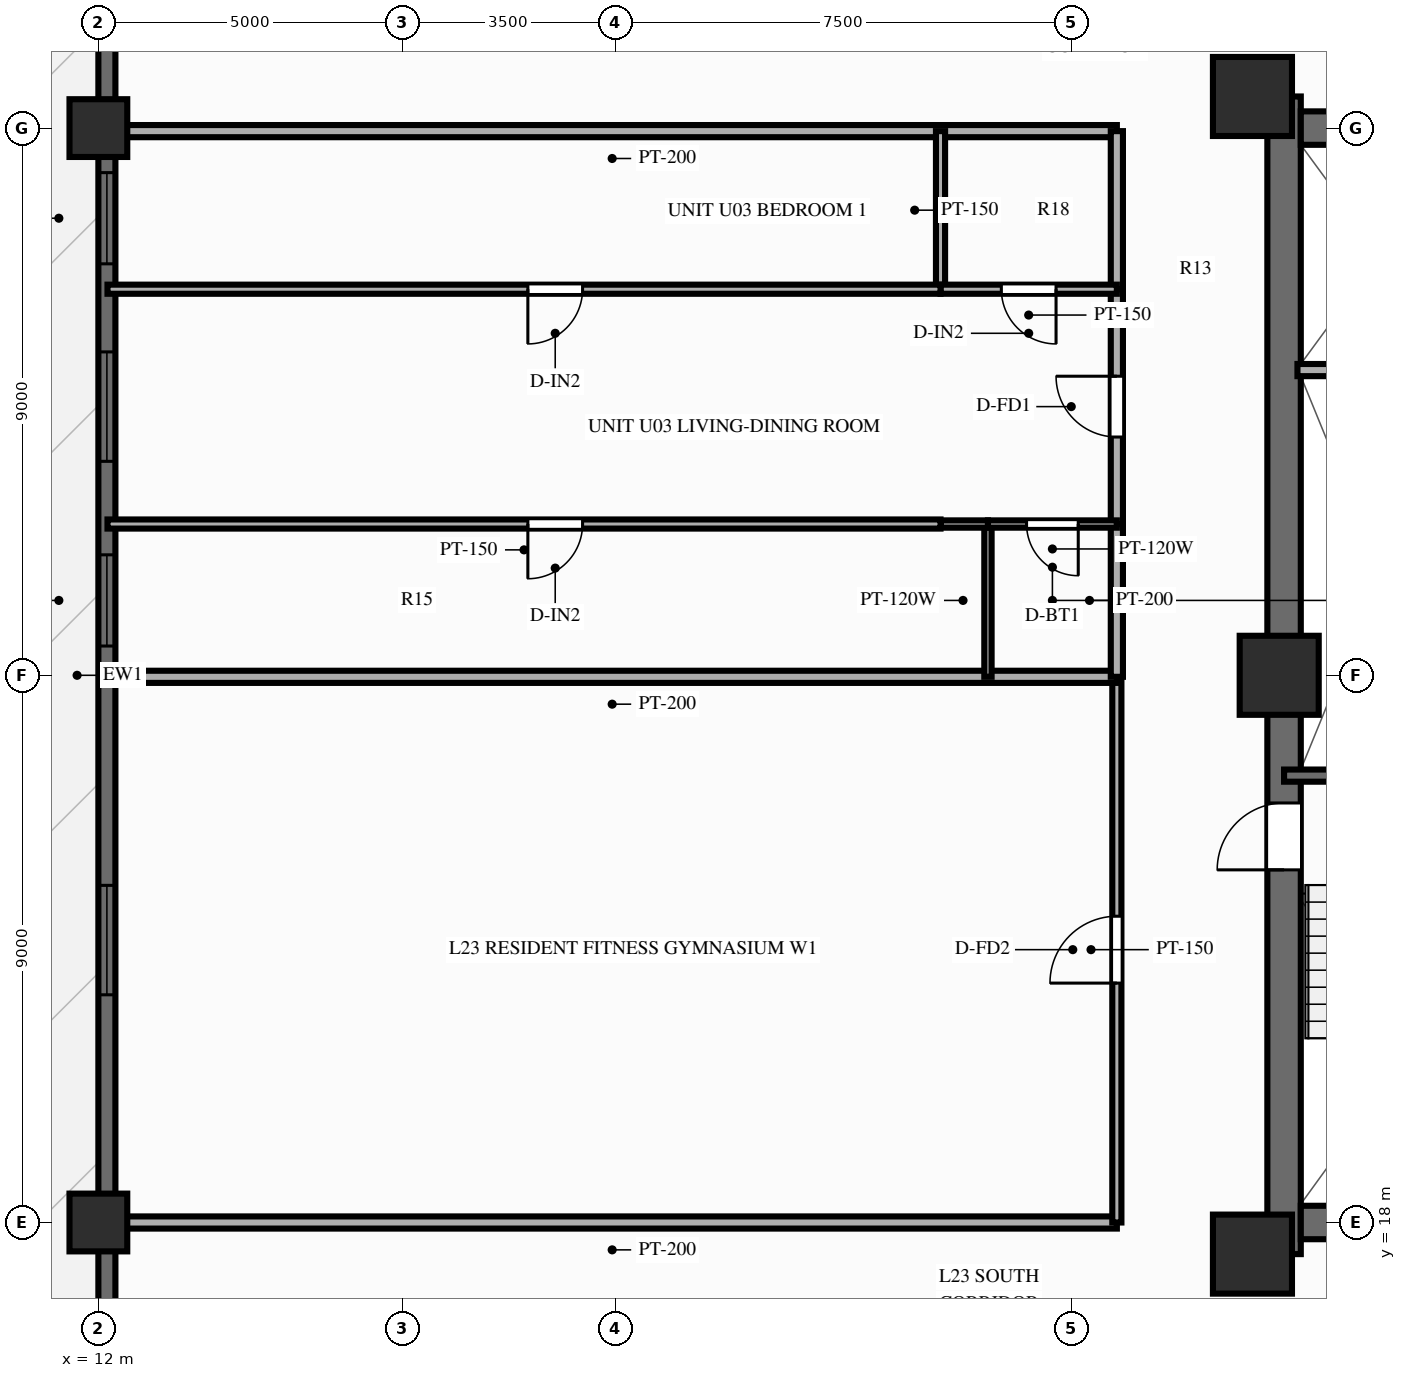
"""IFC4 building model, lengths in metres.
Left out: names, types, materials, properties, quantities, classifications, styles, units other than length and angle.
Written with IfcOpenShell. Run it as: python <this file> out.ifc"""

import sys

from ifc_helpers import new_model, si_unit, direction, frame, frame_2d, origin, origin_2d, place, context, subcontext, project, spatial, rectangle, extrude, source, transform, mapped, element, fill, save


model = new_model("IFC4")
c1 = context("Model", 3, precision=1e-05, world=origin(), true_north=direction((0.0, 1.0)))
c2 = subcontext(c1, "Body", "Model", "MODEL_VIEW")
j1 = project(units=[si_unit("LENGTHUNIT", "METRE"), si_unit("PLANEANGLEUNIT", "RADIAN")], contexts=[c1])
p1 = place(None, origin())
s1 = spatial("IfcSite", under=j1, at=p1, CompositionType="ELEMENT")
p2 = place(p1, origin())
s2 = spatial("IfcBuilding", under=s1, at=p2, CompositionType="ELEMENT")
p3 = place(p2, frame((0.0, 0.0, 74.35)))
s3 = spatial("IfcBuildingStorey", under=s2, at=p3, CompositionType="ELEMENT", Elevation=74.35)
p4 = place(p3, frame((31.5, 17.48, 0.0), z_axis=(0.0, 0.0, 1.0), x_axis=(0.0, 1.0, 0.0)))
e1 = element("IfcWall", 1, at=p4, inside=s3, PredefinedType="SHEAR", context=c2, shape_type="SweptSolid", body=[
    extrude(rectangle(XDim=19.04, YDim=0.55, at=frame_2d((9.52, 0.0))), origin(), (0.0, 0.0, 1.0), 3.5),
])
p5 = place(p4, frame((6.32, 0.0, 0.0)))
e2 = element("IfcOpeningElement", 2, at=p5, cuts=e1, PredefinedType="OPENING", context=c2, shape_type="SweptSolid", body=[
    extrude(rectangle(XDim=1.1, YDim=2.15, at=frame_2d((0.55, 1.075))), frame((0.0, 0.287, 0.0), z_axis=(0.0, -1.0, 0.0), x_axis=(1.0, 0.0, 0.0)), (0.0, 0.0, 1.0), 0.574),
])
p6 = place(p3, frame((31.775, 18.0, 0.0), z_axis=(0.0, 0.0, 1.0), x_axis=(1.0, 0.0, 0.0)))
e3 = element("IfcWall", 3, at=p6, inside=s3, PredefinedType="SHEAR", context=c2, shape_type="SweptSolid", body=[
    extrude(rectangle(XDim=12.45, YDim=0.55, at=frame_2d((6.225, 0.0))), origin(), (0.0, 0.0, 1.0), 3.5),
])
p7 = place(p3, frame((31.775, 36.0, 0.0), z_axis=(0.0, 0.0, 1.0), x_axis=(1.0, 0.0, 0.0)))
e4 = element("IfcWall", 4, at=p7, inside=s3, PredefinedType="SHEAR", context=c2, shape_type="SweptSolid", body=[
    extrude(rectangle(XDim=12.45, YDim=0.55, at=frame_2d((6.225, 0.0))), origin(), (0.0, 0.0, 1.0), 3.5),
])
p8 = place(p7, frame((5.175, 0.0, 0.0), z_axis=(0.0, 0.0, 1.0), x_axis=(-1.0, 0.0, 0.0)))
e5 = element("IfcOpeningElement", 5, at=p8, cuts=e4, PredefinedType="OPENING", context=c2, shape_type="SweptSolid", body=[
    extrude(rectangle(XDim=1.4, YDim=2.15, at=frame_2d((0.7, 1.075))), frame((0.0, 0.287, 0.0), z_axis=(0.0, -1.0, 0.0), x_axis=(1.0, 0.0, 0.0)), (0.0, 0.0, 1.0), 0.574),
])
m1 = source(origin(), c2, "Body", "SweptSolid", [
    extrude(rectangle(XDim=1.3, YDim=1.3, at=origin_2d()), origin(), (0.0, 0.0, 1.0), 3.5),
])
for number, where, z_axis, x_axis in (
    (6, (30.98, 17.48, 0.0), (0.0, 0.0, 1.0), (1.0, 0.0, 0.0)),
    (7, (30.98, 36.52, 0.0), (0.0, 0.0, 1.0), (1.0, 0.0, 0.0)),
    (8, (31.42, 27.0, 0.0), (0.0, 0.0, 1.0), (1.0, 0.0, 0.0)),
):
    element("IfcColumn", number, at=place(p3, frame(where, z_axis=z_axis, x_axis=x_axis)), inside=s3, PredefinedType="COLUMN", context=c2, shape_type="MappedRepresentation", body=[
        mapped(m1, transform((0.0, 0.0, 0.0), scale=1.0)),
    ])
m2 = source(origin(), c2, "Body", "SweptSolid", [
    extrude(rectangle(XDim=0.95, YDim=0.95, at=origin_2d()), origin(), (0.0, 0.0, 1.0), 3.5),
])
for number, where, z_axis, x_axis in (
    (9, (12.0, 36.0, 0.0), (0.0, 0.0, 1.0), (1.0, 0.0, 0.0)),
    (10, (12.0, 18.0, 0.0), (0.0, 0.0, 1.0), (1.0, 0.0, 0.0)),
):
    element("IfcColumn", number, at=place(p3, frame(where, z_axis=z_axis, x_axis=x_axis)), inside=s3, PredefinedType="COLUMN", context=c2, shape_type="MappedRepresentation", body=[
        mapped(m2, transform((0.0, 0.0, 0.0), scale=1.0)),
    ])
p9 = place(p3, frame((12.14, 7.2, 0.0), z_axis=(0.0, 0.0, 1.0), x_axis=(0.0, 1.0, 0.0)))
e11 = element("IfcWall", 11, at=p9, inside=s3, PredefinedType="SOLIDWALL", context=c2, shape_type="SweptSolid", body=[
    extrude(rectangle(XDim=39.6, YDim=0.28, at=frame_2d((19.8, 0.0))), origin(), (0.0, 0.0, 1.0), 2.78),
])
p10 = place(p9, frame((4.6, 0.0, 0.0)))
e12 = element("IfcOpeningElement", 12, at=p10, cuts=e11, PredefinedType="OPENING", context=c2, shape_type="SweptSolid", body=[
    extrude(rectangle(XDim=1.6, YDim=2.15, at=frame_2d((0.8, 1.075))), frame((0.0, 0.152, 0.0), z_axis=(0.0, -1.0, 0.0), x_axis=(1.0, 0.0, 0.0)), (0.0, 0.0, 1.0), 0.304),
])
p11 = place(p9, frame((14.545, 0.0, 0.85)))
e13 = element("IfcOpeningElement", 13, at=p11, cuts=e11, PredefinedType="OPENING", context=c2, shape_type="SweptSolid", body=[
    extrude(rectangle(XDim=1.8, YDim=1.65, at=frame_2d((0.9, 0.825))), frame((0.0, 0.152, 0.0), z_axis=(0.0, -1.0, 0.0), x_axis=(1.0, 0.0, 0.0)), (0.0, 0.0, 1.0), 0.304),
])
p12 = place(p9, frame((20.281, 0.0, 0.85)))
e14 = element("IfcOpeningElement", 14, at=p12, cuts=e11, PredefinedType="OPENING", context=c2, shape_type="SweptSolid", body=[
    extrude(rectangle(XDim=1.5, YDim=1.65, at=frame_2d((0.75, 0.825))), frame((0.0, 0.152, 0.0), z_axis=(0.0, -1.0, 0.0), x_axis=(1.0, 0.0, 0.0)), (0.0, 0.0, 1.0), 0.304),
])
p13 = place(p9, frame((23.319, 0.0, 0.85)))
e15 = element("IfcOpeningElement", 15, at=p13, cuts=e11, PredefinedType="OPENING", context=c2, shape_type="SweptSolid", body=[
    extrude(rectangle(XDim=1.8, YDim=1.65, at=frame_2d((0.9, 0.825))), frame((0.0, 0.152, 0.0), z_axis=(0.0, -1.0, 0.0), x_axis=(1.0, 0.0, 0.0)), (0.0, 0.0, 1.0), 0.304),
])
p14 = place(p9, frame((26.567, 0.0, 0.85)))
e16 = element("IfcOpeningElement", 16, at=p14, cuts=e11, PredefinedType="OPENING", context=c2, shape_type="SweptSolid", body=[
    extrude(rectangle(XDim=1.5, YDim=1.65, at=frame_2d((0.75, 0.825))), frame((0.0, 0.152, 0.0), z_axis=(0.0, -1.0, 0.0), x_axis=(1.0, 0.0, 0.0)), (0.0, 0.0, 1.0), 0.304),
])
p15 = place(p9, frame((33.3, 0.0, 0.85)))
e17 = element("IfcOpeningElement", 17, at=p15, cuts=e11, PredefinedType="OPENING", context=c2, shape_type="SweptSolid", body=[
    extrude(rectangle(XDim=1.8, YDim=1.65, at=frame_2d((0.9, 0.825))), frame((0.0, 0.152, 0.0), z_axis=(0.0, -1.0, 0.0), x_axis=(1.0, 0.0, 0.0)), (0.0, 0.0, 1.0), 0.304),
])
p16 = place(p3, frame((31.5, 25.35, 0.0), z_axis=(0.0, 0.0, 1.0), x_axis=(1.0, 0.0, 0.0)))
e18 = element("IfcWall", 18, at=p16, inside=s3, PredefinedType="SOLIDWALL", context=c2, shape_type="SweptSolid", body=[
    extrude(rectangle(XDim=3.93, YDim=0.2, at=frame_2d((1.965, 0.0))), origin(), (0.0, 0.0, 1.0), 3.29),
])
p17 = place(p3, frame((31.72, 32.02, 0.0), z_axis=(0.0, 0.0, 1.0), x_axis=(1.0, 0.0, 0.0)))
e19 = element("IfcWall", 19, at=p17, inside=s3, PredefinedType="PARTITIONING", context=c2, shape_type="SweptSolid", body=[
    extrude(rectangle(XDim=2.8, YDim=0.2, at=frame_2d((1.4, 0.0))), origin(), (0.0, 0.0, 1.0), 3.29),
])
for number, where, z_axis, x_axis in (
    (20, (28.75, 18.0, 0.0), (0.0, 0.0, 1.0), (-1.0, 0.0, 0.0)),
    (21, (28.75, 35.95, 0.0), (0.0, 0.0, 1.0), (-1.0, 0.0, 0.0)),
):
    element("IfcWall", number, at=place(p3, frame(where, z_axis=z_axis, x_axis=x_axis)), inside=s3, PredefinedType="PARTITIONING", context=c2, shape_type="SweptSolid", body=[
        extrude(rectangle(XDim=16.6, YDim=0.2, at=frame_2d((8.3, 0.0))), origin(), (0.0, 0.0, 1.0), 2.84),
    ])
p18 = place(p3, frame((28.75, 18.0, 0.0), z_axis=(0.0, 0.0, 1.0), x_axis=(0.0, 1.0, 0.0)))
e22 = element("IfcWall", 22, at=p18, inside=s3, PredefinedType="PARTITIONING", context=c2, shape_type="SweptSolid", body=[
    extrude(rectangle(XDim=8.975, YDim=0.15, at=frame_2d((4.488, 0.0))), origin(), (0.0, 0.0, 1.0), 3.29),
])
p19 = place(p18, frame((3.938, 0.0, 0.0)))
e23 = element("IfcOpeningElement", 23, at=p19, cuts=e22, PredefinedType="OPENING", context=c2, shape_type="SweptSolid", body=[
    extrude(rectangle(XDim=1.1, YDim=2.15, at=frame_2d((0.55, 1.075))), frame((0.0, 0.087, 0.0), z_axis=(0.0, -1.0, 0.0), x_axis=(1.0, 0.0, 0.0)), (0.0, 0.0, 1.0), 0.174),
])
p20 = place(p3, frame((28.75, 26.975, 0.0), z_axis=(0.0, 0.0, 1.0), x_axis=(-1.0, 0.0, 0.0)))
e24 = element("IfcWall", 24, at=p20, inside=s3, PredefinedType="PARTITIONING", context=c2, shape_type="SweptSolid", body=[
    extrude(rectangle(XDim=16.6, YDim=0.2, at=frame_2d((8.3, 0.0))), origin(), (0.0, 0.0, 1.0), 3.29),
])
p21 = place(p3, frame((28.75, 26.975, 0.0), z_axis=(0.0, 0.0, 1.0), x_axis=(0.0, 1.0, 0.0)))
e25 = element("IfcWall", 25, at=p21, inside=s3, PredefinedType="PARTITIONING", context=c2, shape_type="SweptSolid", body=[
    extrude(rectangle(XDim=2.513, YDim=0.2, at=frame_2d((1.256, 0.0))), origin(), (0.0, 0.0, 1.0), 3.29),
])
p22 = place(p3, frame((28.75, 29.488, 0.0), z_axis=(0.0, 0.0, 1.0), x_axis=(0.0, 1.0, 0.0)))
e26 = element("IfcWall", 26, at=p22, inside=s3, PredefinedType="PARTITIONING", context=c2, shape_type="SweptSolid", body=[
    extrude(rectangle(XDim=3.862, YDim=0.2, at=frame_2d((1.931, 0.0))), origin(), (0.0, 0.0, 1.0), 3.29),
])
p23 = place(p22, frame((1.431, 0.0, 0.0)))
e27 = element("IfcOpeningElement", 27, at=p23, cuts=e26, PredefinedType="OPENING", context=c2, shape_type="SweptSolid", body=[
    extrude(rectangle(XDim=1.0, YDim=2.15, at=frame_2d((0.5, 1.075))), frame((0.0, 0.112, 0.0), z_axis=(0.0, -1.0, 0.0), x_axis=(1.0, 0.0, 0.0)), (0.0, 0.0, 1.0), 0.224),
])
p24 = place(p3, frame((28.75, 33.35, 0.0), z_axis=(0.0, 0.0, 1.0), x_axis=(0.0, 1.0, 0.0)))
e28 = element("IfcWall", 28, at=p24, inside=s3, PredefinedType="PARTITIONING", context=c2, shape_type="SweptSolid", body=[
    extrude(rectangle(XDim=2.6, YDim=0.2, at=frame_2d((1.3, 0.0))), origin(), (0.0, 0.0, 1.0), 3.29),
])
p25 = place(p3, frame((26.63, 26.975, 0.0), z_axis=(0.0, 0.0, 1.0), x_axis=(0.0, 1.0, 0.0)))
e29 = element("IfcWall", 29, at=p25, inside=s3, PredefinedType="PARTITIONING", context=c2, shape_type="SweptSolid", body=[
    extrude(rectangle(XDim=2.513, YDim=0.12, at=frame_2d((1.256, 0.0))), origin(), (0.0, 0.0, 1.0), 3.29),
])
p26 = place(p3, frame((25.85, 33.35, 0.0), z_axis=(0.0, 0.0, 1.0), x_axis=(0.0, 1.0, 0.0)))
e30 = element("IfcWall", 30, at=p26, inside=s3, PredefinedType="PARTITIONING", context=c2, shape_type="SweptSolid", body=[
    extrude(rectangle(XDim=2.6, YDim=0.15, at=frame_2d((1.3, 0.0))), origin(), (0.0, 0.0, 1.0), 3.29),
])
p27 = place(p3, frame((28.75, 29.488, 0.0), z_axis=(0.0, 0.0, 1.0), x_axis=(-1.0, 0.0, 0.0)))
e31 = element("IfcWall", 31, at=p27, inside=s3, PredefinedType="PARTITIONING", context=c2, shape_type="SweptSolid", body=[
    extrude(rectangle(XDim=2.12, YDim=0.12, at=frame_2d((1.06, 0.0))), origin(), (0.0, 0.0, 1.0), 3.29),
])
p28 = place(p27, frame((0.635, 0.0, 0.0)))
e32 = element("IfcOpeningElement", 32, at=p28, cuts=e31, PredefinedType="OPENING", context=c2, shape_type="SweptSolid", body=[
    extrude(rectangle(XDim=0.85, YDim=2.05, at=frame_2d((0.425, 1.025))), frame((0.0, 0.072, 0.0), z_axis=(0.0, -1.0, 0.0), x_axis=(1.0, 0.0, 0.0)), (0.0, 0.0, 1.0), 0.144),
])
p29 = place(p3, frame((26.63, 29.488, 0.0), z_axis=(0.0, 0.0, 1.0), x_axis=(-1.0, 0.0, 0.0)))
e33 = element("IfcWall", 33, at=p29, inside=s3, PredefinedType="PARTITIONING", context=c2, shape_type="SweptSolid", body=[
    extrude(rectangle(XDim=0.78, YDim=0.12, at=frame_2d((0.39, 0.0))), origin(), (0.0, 0.0, 1.0), 3.29),
])
p30 = place(p3, frame((25.85, 29.488, 0.0), z_axis=(0.0, 0.0, 1.0), x_axis=(-1.0, 0.0, 0.0)))
e34 = element("IfcWall", 34, at=p30, inside=s3, PredefinedType="PARTITIONING", context=c2, shape_type="SweptSolid", body=[
    extrude(rectangle(XDim=13.7, YDim=0.15, at=frame_2d((6.85, 0.0))), origin(), (0.0, 0.0, 1.0), 3.29),
])
p31 = place(p30, frame((5.887, 0.0, 0.0)))
e35 = element("IfcOpeningElement", 35, at=p31, cuts=e34, PredefinedType="OPENING", context=c2, shape_type="SweptSolid", body=[
    extrude(rectangle(XDim=0.9, YDim=2.1, at=frame_2d((0.45, 1.05))), frame((0.0, 0.087, 0.0), z_axis=(0.0, -1.0, 0.0), x_axis=(1.0, 0.0, 0.0)), (0.0, 0.0, 1.0), 0.174),
])
p32 = place(p3, frame((28.75, 33.35, 0.0), z_axis=(0.0, 0.0, 1.0), x_axis=(-1.0, 0.0, 0.0)))
e36 = element("IfcWall", 36, at=p32, inside=s3, PredefinedType="PARTITIONING", context=c2, shape_type="SweptSolid", body=[
    extrude(rectangle(XDim=2.9, YDim=0.15, at=frame_2d((1.45, 0.0))), origin(), (0.0, 0.0, 1.0), 3.29),
])
p33 = place(p32, frame((1.0, 0.0, 0.0)))
e37 = element("IfcOpeningElement", 37, at=p33, cuts=e36, PredefinedType="OPENING", context=c2, shape_type="SweptSolid", body=[
    extrude(rectangle(XDim=0.9, YDim=2.1, at=frame_2d((0.45, 1.05))), frame((0.0, 0.087, 0.0), z_axis=(0.0, -1.0, 0.0), x_axis=(1.0, 0.0, 0.0)), (0.0, 0.0, 1.0), 0.174),
])
p34 = place(p3, frame((25.85, 33.35, 0.0), z_axis=(0.0, 0.0, 1.0), x_axis=(-1.0, 0.0, 0.0)))
e38 = element("IfcWall", 38, at=p34, inside=s3, PredefinedType="PARTITIONING", context=c2, shape_type="SweptSolid", body=[
    extrude(rectangle(XDim=13.7, YDim=0.15, at=frame_2d((6.85, 0.0))), origin(), (0.0, 0.0, 1.0), 3.29),
])
p35 = place(p34, frame((5.887, 0.0, 0.0)))
e39 = element("IfcOpeningElement", 39, at=p35, cuts=e38, PredefinedType="OPENING", context=c2, shape_type="SweptSolid", body=[
    extrude(rectangle(XDim=0.9, YDim=2.1, at=frame_2d((0.45, 1.05))), frame((0.0, 0.087, 0.0), z_axis=(0.0, -1.0, 0.0), x_axis=(1.0, 0.0, 0.0)), (0.0, 0.0, 1.0), 0.174),
])
m3 = source(origin(), c2, "Body", "SweptSolid", [
    extrude(rectangle(XDim=1.8, YDim=1.65, at=frame_2d((0.9, 0.825))), frame((0.0, 0.03, 0.0), z_axis=(0.0, -1.0, 0.0), x_axis=(1.0, 0.0, 0.0)), (0.0, 0.0, 1.0), 0.06),
])
p36 = place(p11, origin())
e40 = element("IfcWindow", 40, at=p36, inside=s3, PartitioningType="SINGLE_PANEL", PredefinedType="WINDOW", context=c2, shape_type="MappedRepresentation", body=[
    mapped(m3, transform((0.0, 0.0, 0.0), scale=1.0)),
])
fill(e13, e40)
m4 = source(origin(), c2, "Body", "SweptSolid", [
    extrude(rectangle(XDim=1.5, YDim=1.65, at=frame_2d((0.75, 0.825))), frame((0.0, 0.03, 0.0), z_axis=(0.0, -1.0, 0.0), x_axis=(1.0, 0.0, 0.0)), (0.0, 0.0, 1.0), 0.06),
])
p37 = place(p12, origin())
e41 = element("IfcWindow", 41, at=p37, inside=s3, PartitioningType="SINGLE_PANEL", PredefinedType="WINDOW", context=c2, shape_type="MappedRepresentation", body=[
    mapped(m4, transform((0.0, 0.0, 0.0), scale=1.0)),
])
fill(e14, e41)
p38 = place(p13, origin())
e42 = element("IfcWindow", 42, at=p38, inside=s3, PartitioningType="SINGLE_PANEL", PredefinedType="WINDOW", context=c2, shape_type="MappedRepresentation", body=[
    mapped(m3, transform((0.0, 0.0, 0.0), scale=1.0)),
])
fill(e15, e42)
p39 = place(p14, origin())
e43 = element("IfcWindow", 43, at=p39, inside=s3, PartitioningType="SINGLE_PANEL", PredefinedType="WINDOW", context=c2, shape_type="MappedRepresentation", body=[
    mapped(m4, transform((0.0, 0.0, 0.0), scale=1.0)),
])
fill(e16, e43)
m5 = source(origin(), c2, "Body", "SweptSolid", [
    extrude(rectangle(XDim=1.1, YDim=2.15, at=frame_2d((0.55, 1.075))), frame((0.0, 0.025, 0.0), z_axis=(0.0, -1.0, 0.0), x_axis=(1.0, 0.0, 0.0)), (0.0, 0.0, 1.0), 0.05),
])
p40 = place(p5, origin())
e44 = element("IfcDoor", 44, at=p40, inside=s3, OperationType="SINGLE_SWING_LEFT", PredefinedType="DOOR", context=c2, shape_type="MappedRepresentation", body=[
    mapped(m5, transform((0.0, 0.0, 0.0), scale=1.0)),
])
fill(e2, e44)
p41 = place(p19, origin())
e45 = element("IfcDoor", 45, at=p41, inside=s3, OperationType="SINGLE_SWING_LEFT", PredefinedType="DOOR", context=c2, shape_type="MappedRepresentation", body=[
    mapped(m5, transform((0.0, 0.0, 0.0), scale=1.0)),
])
fill(e23, e45)
m6 = source(origin(), c2, "Body", "SweptSolid", [
    extrude(rectangle(XDim=1.0, YDim=2.15, at=frame_2d((0.5, 1.075))), frame((0.0, 0.025, 0.0), z_axis=(0.0, -1.0, 0.0), x_axis=(1.0, 0.0, 0.0)), (0.0, 0.0, 1.0), 0.05),
])
p42 = place(p23, origin())
e46 = element("IfcDoor", 46, at=p42, inside=s3, OperationType="SINGLE_SWING_RIGHT", PredefinedType="DOOR", context=c2, shape_type="MappedRepresentation", body=[
    mapped(m6, transform((0.0, 0.0, 0.0), scale=1.0)),
])
fill(e27, e46)
m7 = source(origin(), c2, "Body", "SweptSolid", [
    extrude(rectangle(XDim=0.85, YDim=2.05, at=frame_2d((0.425, 1.025))), frame((0.0, 0.025, 0.0), z_axis=(0.0, -1.0, 0.0), x_axis=(1.0, 0.0, 0.0)), (0.0, 0.0, 1.0), 0.05),
])
p43 = place(p28, origin())
e47 = element("IfcDoor", 47, at=p43, inside=s3, OperationType="SINGLE_SWING_LEFT", PredefinedType="DOOR", context=c2, shape_type="MappedRepresentation", body=[
    mapped(m7, transform((0.0, 0.0, 0.0), scale=1.0)),
])
fill(e32, e47)
m8 = source(origin(), c2, "Body", "SweptSolid", [
    extrude(rectangle(XDim=0.9, YDim=2.1, at=frame_2d((0.45, 1.05))), frame((0.0, 0.025, 0.0), z_axis=(0.0, -1.0, 0.0), x_axis=(1.0, 0.0, 0.0)), (0.0, 0.0, 1.0), 0.05),
])
p44 = place(p31, origin())
e48 = element("IfcDoor", 48, at=p44, inside=s3, OperationType="SINGLE_SWING_RIGHT", PredefinedType="DOOR", context=c2, shape_type="MappedRepresentation", body=[
    mapped(m8, transform((0.0, 0.0, 0.0), scale=1.0)),
])
fill(e35, e48)
p45 = place(p33, origin())
e49 = element("IfcDoor", 49, at=p45, inside=s3, OperationType="SINGLE_SWING_LEFT", PredefinedType="DOOR", context=c2, shape_type="MappedRepresentation", body=[
    mapped(m8, transform((0.0, 0.0, 0.0), scale=1.0)),
])
fill(e37, e49)
p46 = place(p35, origin())
e50 = element("IfcDoor", 50, at=p46, inside=s3, OperationType="SINGLE_SWING_RIGHT", PredefinedType="DOOR", context=c2, shape_type="MappedRepresentation", body=[
    mapped(m8, transform((0.0, 0.0, 0.0), scale=1.0)),
])
fill(e39, e50)
save(model, sys.argv[1])
